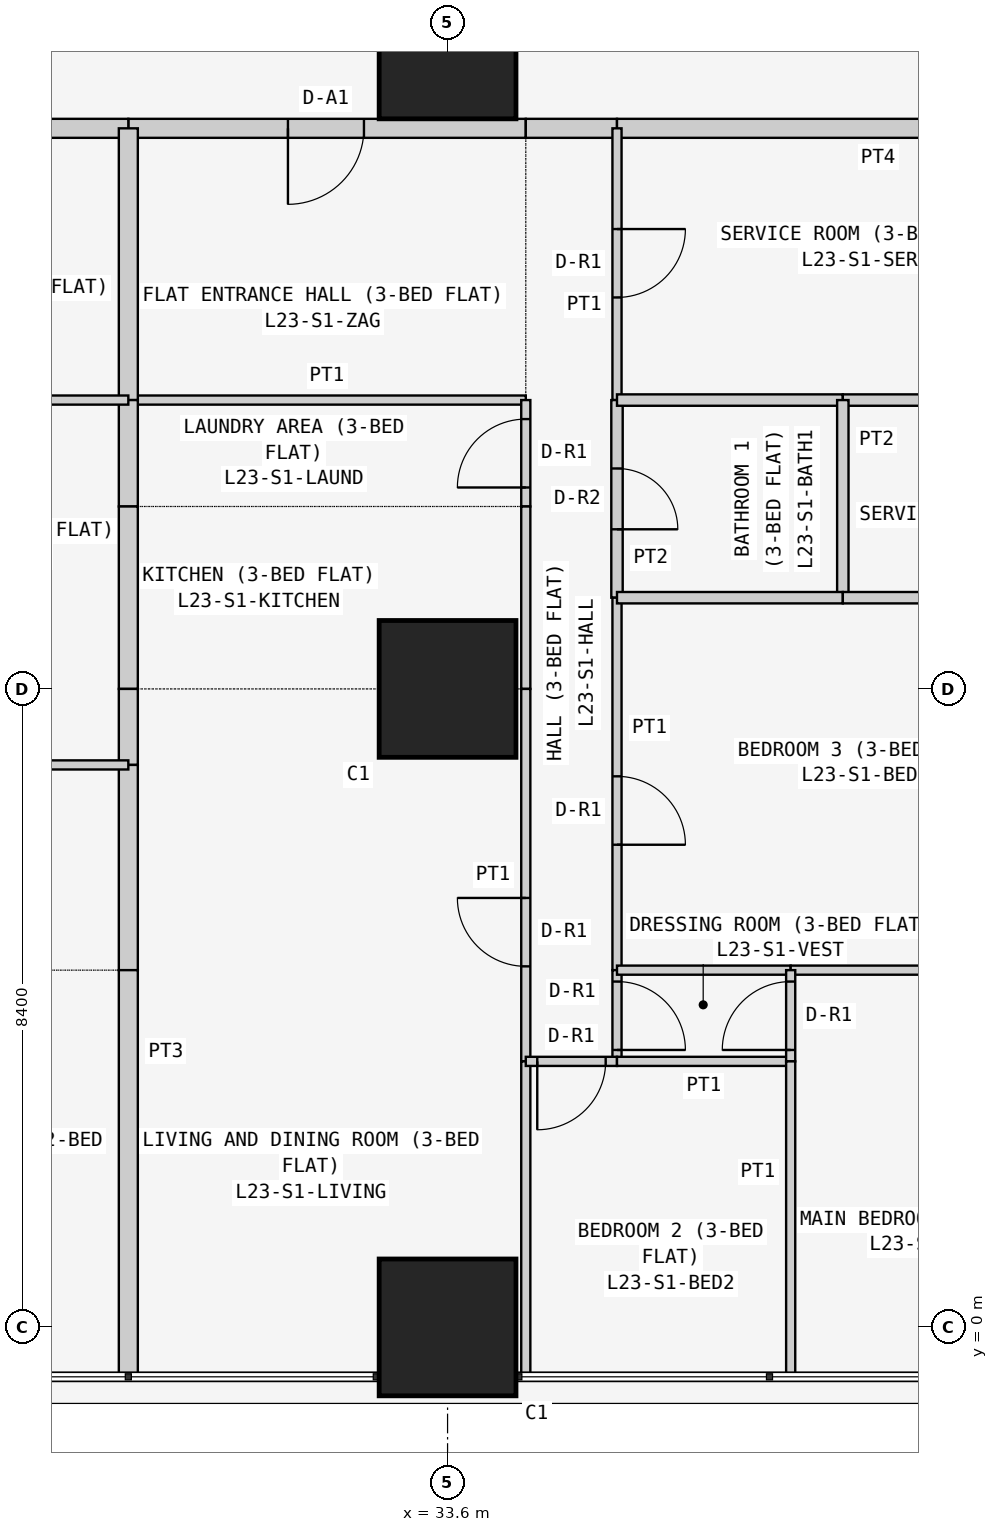
"""IFC4 building model, lengths in metres.
Left out: names, types, materials, properties, quantities, classifications, styles, units other than length and angle.
Written with IfcOpenShell. Run it as: python <this file> out.ifc"""

import sys

from ifc_helpers import new_model, si_unit, direction, frame, frame_2d, origin, origin_2d, place, context, subcontext, project, spatial, rectangle, extrude, element, fill, save


model = new_model("IFC4")
c1 = context("Model", 3, precision=1e-05, world=origin(), true_north=direction((0.0, 1.0)))
c2 = subcontext(c1, "Body", "Model", "MODEL_VIEW")
j1 = project(units=[si_unit("LENGTHUNIT", "METRE"), si_unit("PLANEANGLEUNIT", "RADIAN")], contexts=[c1])
p1 = place(None, origin())
s1 = spatial("IfcSite", under=j1, at=p1, CompositionType="ELEMENT")
p2 = place(p1, origin())
s2 = spatial("IfcBuilding", under=s1, at=p2, CompositionType="ELEMENT")
p3 = place(p2, frame((0.0, 0.0, 92.1)))
s3 = spatial("IfcBuildingStorey", under=s2, at=p3, CompositionType="ELEMENT", Elevation=92.1)
for number, where, z_axis, x_axis in (
    (1, (33.6, 0.0, 0.0), (0.0, 0.0, 1.0), (1.0, 0.0, 0.0)),
    (2, (33.6, 8.4, 0.0), (0.0, 0.0, 1.0), (1.0, 0.0, 0.0)),
    (3, (33.6, 16.8, 0.0), (0.0, 0.0, 1.0), (1.0, 0.0, 0.0)),
):
    element("IfcColumn", number, at=place(p3, frame(where, z_axis=z_axis, x_axis=x_axis)), inside=s3, PredefinedType="COLUMN", context=c2, shape_type="SweptSolid", body=[
        extrude(rectangle(XDim=1.8, YDim=1.8, at=origin_2d()), origin(), (0.0, 0.0, 1.0), 3.6),
    ])
p4 = place(p3, frame((34.629, 15.775, 0.0), z_axis=(0.0, 0.0, 1.0), x_axis=(-1.0, 0.0, 0.0)))
e4 = element("IfcWall", 4, at=p4, inside=s3, PredefinedType="PARTITIONING", context=c2, shape_type="SweptSolid", body=[
    extrude(rectangle(XDim=5.229, YDim=0.25, at=frame_2d((2.615, 0.0))), origin(), (0.0, 0.0, 1.0), 3.45),
])
p5 = place(p4, frame((2.129, 0.0, 0.0)))
e5 = element("IfcOpeningElement", 5, at=p5, cuts=e4, PredefinedType="OPENING", context=c2, shape_type="SweptSolid", body=[
    extrude(rectangle(XDim=1.0, YDim=2.1, at=frame_2d((0.5, 1.05))), frame((0.0, 0.135, 0.0), z_axis=(0.0, -1.0, 0.0), x_axis=(1.0, 0.0, 0.0)), (0.0, 0.0, 1.0), 0.27),
])
p6 = place(p3, frame((35.829, 15.775, 0.0), z_axis=(0.0, 0.0, 1.0), x_axis=(-1.0, 0.0, 0.0)))
e6 = element("IfcWall", 6, at=p6, inside=s3, PredefinedType="PARTITIONING", context=c2, shape_type="SweptSolid", body=[
    extrude(rectangle(XDim=1.2, YDim=0.25, at=frame_2d((0.6, 0.0))), origin(), (0.0, 0.0, 1.0), 3.45),
])
p7 = place(p3, frame((42.7, 15.775, 0.0), z_axis=(0.0, 0.0, 1.0), x_axis=(-1.0, 0.0, 0.0)))
e7 = element("IfcWall", 7, at=p7, inside=s3, PredefinedType="PARTITIONING", context=c2, shape_type="SweptSolid", body=[
    extrude(rectangle(XDim=6.871, YDim=0.25, at=frame_2d((3.436, 0.0))), origin(), (0.0, 0.0, 1.0), 3.45),
])
p8 = place(p3, frame((29.4, 15.775, 0.0), z_axis=(0.0, 0.0, 1.0), x_axis=(-1.0, 0.0, 0.0)))
e8 = element("IfcWall", 8, at=p8, inside=s3, PredefinedType="PARTITIONING", context=c2, shape_type="SweptSolid", body=[
    extrude(rectangle(XDim=5.229, YDim=0.25, at=frame_2d((2.615, 0.0))), origin(), (0.0, 0.0, 1.0), 3.45),
])
p9 = place(p8, frame((2.1, 0.0, 0.0)))
e9 = element("IfcOpeningElement", 9, at=p9, cuts=e8, PredefinedType="OPENING", context=c2, shape_type="SweptSolid", body=[
    extrude(rectangle(XDim=1.0, YDim=2.1, at=frame_2d((0.5, 1.05))), frame((0.0, 0.135, 0.0), z_axis=(0.0, -1.0, 0.0), x_axis=(1.0, 0.0, 0.0)), (0.0, 0.0, 1.0), 0.27),
])
p10 = place(p3, frame((29.4, 12.2, 0.0), z_axis=(0.0, 0.0, 1.0), x_axis=(1.0, 0.0, 0.0)))
e10 = element("IfcWall", 10, at=p10, inside=s3, PredefinedType="PARTITIONING", context=c2, shape_type="SweptSolid", body=[
    extrude(rectangle(XDim=5.229, YDim=0.12, at=frame_2d((2.615, 0.0))), origin(), (0.0, 0.0, 1.0), 3.45),
])
p11 = place(p3, frame((29.4, 15.775, 0.0), z_axis=(0.0, 0.0, 1.0), x_axis=(0.0, -1.0, 0.0)))
e11 = element("IfcWall", 11, at=p11, inside=s3, PredefinedType="PARTITIONING", context=c2, shape_type="SweptSolid", body=[
    extrude(rectangle(XDim=3.575, YDim=0.25, at=frame_2d((1.788, 0.0))), origin(), (0.0, 0.0, 1.0), 2.848),
])
p12 = place(p3, frame((34.629, 10.8, 0.0), z_axis=(0.0, 0.0, 1.0), x_axis=(0.0, 1.0, 0.0)))
e12 = element("IfcWall", 12, at=p12, inside=s3, PredefinedType="PARTITIONING", context=c2, shape_type="SweptSolid", body=[
    extrude(rectangle(XDim=1.4, YDim=0.12, at=frame_2d((0.7, 0.0))), origin(), (0.0, 0.0, 1.0), 3.45),
])
p13 = place(p12, frame((0.25, 0.0, 0.0)))
e13 = element("IfcOpeningElement", 13, at=p13, cuts=e12, PredefinedType="OPENING", context=c2, shape_type="SweptSolid", body=[
    extrude(rectangle(XDim=0.9, YDim=2.1, at=frame_2d((0.45, 1.05))), frame((0.0, 0.07, 0.0), z_axis=(0.0, -1.0, 0.0), x_axis=(1.0, 0.0, 0.0)), (0.0, 0.0, 1.0), 0.14),
])
p14 = place(p3, frame((29.4, 12.2, 0.0), z_axis=(0.0, 0.0, 1.0), x_axis=(0.0, -1.0, 0.0)))
e14 = element("IfcWall", 14, at=p14, inside=s3, PredefinedType="PARTITIONING", context=c2, shape_type="SweptSolid", body=[
    extrude(rectangle(XDim=1.4, YDim=0.25, at=frame_2d((0.7, 0.0))), origin(), (0.0, 0.0, 1.0), 2.848),
])
p15 = place(p3, frame((34.629, 8.4, 0.0), z_axis=(0.0, 0.0, 1.0), x_axis=(0.0, 1.0, 0.0)))
e15 = element("IfcWall", 15, at=p15, inside=s3, PredefinedType="PARTITIONING", context=c2, shape_type="SweptSolid", body=[
    extrude(rectangle(XDim=2.4, YDim=0.12, at=frame_2d((1.2, 0.0))), origin(), (0.0, 0.0, 1.0), 3.45),
])
p16 = place(p3, frame((29.4, 10.8, 0.0), z_axis=(0.0, 0.0, 1.0), x_axis=(0.0, -1.0, 0.0)))
e16 = element("IfcWall", 16, at=p16, inside=s3, PredefinedType="PARTITIONING", context=c2, shape_type="SweptSolid", body=[
    extrude(rectangle(XDim=2.4, YDim=0.25, at=frame_2d((1.2, 0.0))), origin(), (0.0, 0.0, 1.0), 2.848),
])
p17 = place(p3, frame((34.629, 3.5, 0.0), z_axis=(0.0, 0.0, 1.0), x_axis=(0.0, 1.0, 0.0)))
e17 = element("IfcWall", 17, at=p17, inside=s3, PredefinedType="PARTITIONING", context=c2, shape_type="SweptSolid", body=[
    extrude(rectangle(XDim=4.9, YDim=0.12, at=frame_2d((2.45, 0.0))), origin(), (0.0, 0.0, 1.0), 3.45),
])
p18 = place(p17, frame((1.25, 0.0, 0.0)))
e18 = element("IfcOpeningElement", 18, at=p18, cuts=e17, PredefinedType="OPENING", context=c2, shape_type="SweptSolid", body=[
    extrude(rectangle(XDim=0.9, YDim=2.1, at=frame_2d((0.45, 1.05))), frame((0.0, 0.07, 0.0), z_axis=(0.0, -1.0, 0.0), x_axis=(1.0, 0.0, 0.0)), (0.0, 0.0, 1.0), 0.14),
])
p19 = place(p3, frame((34.629, -0.65, 0.0), z_axis=(0.0, 0.0, 1.0), x_axis=(0.0, 1.0, 0.0)))
e19 = element("IfcWall", 19, at=p19, inside=s3, PredefinedType="PARTITIONING", context=c2, shape_type="SweptSolid", body=[
    extrude(rectangle(XDim=4.15, YDim=0.12, at=frame_2d((2.075, 0.0))), origin(), (0.0, 0.0, 1.0), 3.45),
])
p20 = place(p3, frame((29.4, 8.4, 0.0), z_axis=(0.0, 0.0, 1.0), x_axis=(0.0, -1.0, 0.0)))
e20 = element("IfcWall", 20, at=p20, inside=s3, PredefinedType="PARTITIONING", context=c2, shape_type="SweptSolid", body=[
    extrude(rectangle(XDim=1.0, YDim=0.25, at=frame_2d((0.5, 0.0))), origin(), (0.0, 0.0, 1.0), 2.848),
])
p21 = place(p3, frame((29.4, 7.4, 0.0), z_axis=(0.0, 0.0, 1.0), x_axis=(0.0, -1.0, 0.0)))
e21 = element("IfcWall", 21, at=p21, inside=s3, PredefinedType="PARTITIONING", context=c2, shape_type="SweptSolid", body=[
    extrude(rectangle(XDim=2.7, YDim=0.25, at=frame_2d((1.35, 0.0))), origin(), (0.0, 0.0, 1.0), 2.848),
])
p22 = place(p3, frame((29.4, 4.7, 0.0), z_axis=(0.0, 0.0, 1.0), x_axis=(0.0, -1.0, 0.0)))
e22 = element("IfcWall", 22, at=p22, inside=s3, PredefinedType="PARTITIONING", context=c2, shape_type="SweptSolid", body=[
    extrude(rectangle(XDim=5.35, YDim=0.25, at=frame_2d((2.675, 0.0))), origin(), (0.0, 0.0, 1.0), 2.848),
])
p23 = place(p3, frame((35.829, 12.2, 0.0), z_axis=(0.0, 0.0, 1.0), x_axis=(0.0, 1.0, 0.0)))
e23 = element("IfcWall", 23, at=p23, inside=s3, PredefinedType="PARTITIONING", context=c2, shape_type="SweptSolid", body=[
    extrude(rectangle(XDim=3.575, YDim=0.12, at=frame_2d((1.788, 0.0))), origin(), (0.0, 0.0, 1.0), 3.45),
])
p24 = place(p23, frame((1.35, 0.0, 0.0)))
e24 = element("IfcOpeningElement", 24, at=p24, cuts=e23, PredefinedType="OPENING", context=c2, shape_type="SweptSolid", body=[
    extrude(rectangle(XDim=0.9, YDim=2.1, at=frame_2d((0.45, 1.05))), frame((0.0, 0.07, 0.0), z_axis=(0.0, -1.0, 0.0), x_axis=(1.0, 0.0, 0.0)), (0.0, 0.0, 1.0), 0.14),
])
p25 = place(p3, frame((35.829, 9.6, 0.0), z_axis=(0.0, 0.0, 1.0), x_axis=(0.0, 1.0, 0.0)))
e25 = element("IfcWall", 25, at=p25, inside=s3, PredefinedType="PARTITIONING", context=c2, shape_type="SweptSolid", body=[
    extrude(rectangle(XDim=2.6, YDim=0.15, at=frame_2d((1.3, 0.0))), origin(), (0.0, 0.0, 1.0), 3.45),
])
p26 = place(p25, frame((0.9, 0.0, 0.0)))
e26 = element("IfcOpeningElement", 26, at=p26, cuts=e25, PredefinedType="OPENING", context=c2, shape_type="SweptSolid", body=[
    extrude(rectangle(XDim=0.8, YDim=2.1, at=frame_2d((0.4, 1.05))), frame((0.0, 0.085, 0.0), z_axis=(0.0, -1.0, 0.0), x_axis=(1.0, 0.0, 0.0)), (0.0, 0.0, 1.0), 0.17),
])
p27 = place(p3, frame((35.829, 4.7, 0.0), z_axis=(0.0, 0.0, 1.0), x_axis=(0.0, 1.0, 0.0)))
e27 = element("IfcWall", 27, at=p27, inside=s3, PredefinedType="PARTITIONING", context=c2, shape_type="SweptSolid", body=[
    extrude(rectangle(XDim=4.9, YDim=0.12, at=frame_2d((2.45, 0.0))), origin(), (0.0, 0.0, 1.0), 3.45),
])
p28 = place(p27, frame((1.65, 0.0, 0.0)))
e28 = element("IfcOpeningElement", 28, at=p28, cuts=e27, PredefinedType="OPENING", context=c2, shape_type="SweptSolid", body=[
    extrude(rectangle(XDim=0.9, YDim=2.1, at=frame_2d((0.45, 1.05))), frame((0.0, 0.07, 0.0), z_axis=(0.0, -1.0, 0.0), x_axis=(1.0, 0.0, 0.0)), (0.0, 0.0, 1.0), 0.14),
])
p29 = place(p3, frame((35.829, 3.5, 0.0), z_axis=(0.0, 0.0, 1.0), x_axis=(0.0, 1.0, 0.0)))
e29 = element("IfcWall", 29, at=p29, inside=s3, PredefinedType="PARTITIONING", context=c2, shape_type="SweptSolid", body=[
    extrude(rectangle(XDim=1.2, YDim=0.12, at=frame_2d((0.6, 0.0))), origin(), (0.0, 0.0, 1.0), 3.45),
])
p30 = place(p29, frame((0.15, 0.0, 0.0)))
e30 = element("IfcOpeningElement", 30, at=p30, cuts=e29, PredefinedType="OPENING", context=c2, shape_type="SweptSolid", body=[
    extrude(rectangle(XDim=0.9, YDim=2.1, at=frame_2d((0.45, 1.05))), frame((0.0, 0.07, 0.0), z_axis=(0.0, -1.0, 0.0), x_axis=(1.0, 0.0, 0.0)), (0.0, 0.0, 1.0), 0.14),
])
p31 = place(p3, frame((34.629, 3.5, 0.0), z_axis=(0.0, 0.0, 1.0), x_axis=(1.0, 0.0, 0.0)))
e31 = element("IfcWall", 31, at=p31, inside=s3, PredefinedType="PARTITIONING", context=c2, shape_type="SweptSolid", body=[
    extrude(rectangle(XDim=1.2, YDim=0.12, at=frame_2d((0.6, 0.0))), origin(), (0.0, 0.0, 1.0), 3.45),
])
p32 = place(p31, frame((0.151, 0.0, 0.0)))
e32 = element("IfcOpeningElement", 32, at=p32, cuts=e31, PredefinedType="OPENING", context=c2, shape_type="SweptSolid", body=[
    extrude(rectangle(XDim=0.9, YDim=2.1, at=frame_2d((0.45, 1.05))), frame((0.0, 0.07, 0.0), z_axis=(0.0, -1.0, 0.0), x_axis=(1.0, 0.0, 0.0)), (0.0, 0.0, 1.0), 0.14),
])
p33 = place(p3, frame((35.829, 12.2, 0.0), z_axis=(0.0, 0.0, 1.0), x_axis=(1.0, 0.0, 0.0)))
e33 = element("IfcWall", 33, at=p33, inside=s3, PredefinedType="PARTITIONING", context=c2, shape_type="SweptSolid", body=[
    extrude(rectangle(XDim=2.971, YDim=0.15, at=frame_2d((1.485, 0.0))), origin(), (0.0, 0.0, 1.0), 3.45),
])
p34 = place(p3, frame((38.8, 12.2, 0.0), z_axis=(0.0, 0.0, 1.0), x_axis=(1.0, 0.0, 0.0)))
e34 = element("IfcWall", 34, at=p34, inside=s3, PredefinedType="PARTITIONING", context=c2, shape_type="SweptSolid", body=[
    extrude(rectangle(XDim=3.9, YDim=0.15, at=frame_2d((1.95, 0.0))), origin(), (0.0, 0.0, 1.0), 3.45),
])
p35 = place(p34, frame((1.25, 0.0, 0.0)))
e35 = element("IfcOpeningElement", 35, at=p35, cuts=e34, PredefinedType="OPENING", context=c2, shape_type="SweptSolid", body=[
    extrude(rectangle(XDim=0.8, YDim=2.1, at=frame_2d((0.4, 1.05))), frame((0.0, 0.085, 0.0), z_axis=(0.0, -1.0, 0.0), x_axis=(1.0, 0.0, 0.0)), (0.0, 0.0, 1.0), 0.17),
])
p36 = place(p3, frame((38.8, 9.6, 0.0), z_axis=(0.0, 0.0, 1.0), x_axis=(0.0, 1.0, 0.0)))
e36 = element("IfcWall", 36, at=p36, inside=s3, PredefinedType="PARTITIONING", context=c2, shape_type="SweptSolid", body=[
    extrude(rectangle(XDim=2.6, YDim=0.15, at=frame_2d((1.3, 0.0))), origin(), (0.0, 0.0, 1.0), 3.45),
])
p37 = place(p3, frame((35.829, 9.6, 0.0), z_axis=(0.0, 0.0, 1.0), x_axis=(1.0, 0.0, 0.0)))
e37 = element("IfcWall", 37, at=p37, inside=s3, PredefinedType="PARTITIONING", context=c2, shape_type="SweptSolid", body=[
    extrude(rectangle(XDim=2.971, YDim=0.15, at=frame_2d((1.485, 0.0))), origin(), (0.0, 0.0, 1.0), 3.45),
])
p38 = place(p3, frame((38.8, 9.6, 0.0), z_axis=(0.0, 0.0, 1.0), x_axis=(1.0, 0.0, 0.0)))
e38 = element("IfcWall", 38, at=p38, inside=s3, PredefinedType="PARTITIONING", context=c2, shape_type="SweptSolid", body=[
    extrude(rectangle(XDim=3.9, YDim=0.15, at=frame_2d((1.95, 0.0))), origin(), (0.0, 0.0, 1.0), 3.45),
])
p39 = place(p3, frame((35.829, 4.7, 0.0), z_axis=(0.0, 0.0, 1.0), x_axis=(1.0, 0.0, 0.0)))
e39 = element("IfcWall", 39, at=p39, inside=s3, PredefinedType="PARTITIONING", context=c2, shape_type="SweptSolid", body=[
    extrude(rectangle(XDim=2.285, YDim=0.12, at=frame_2d((1.143, 0.0))), origin(), (0.0, 0.0, 1.0), 3.45),
])
p40 = place(p3, frame((38.114, 4.7, 0.0), z_axis=(0.0, 0.0, 1.0), x_axis=(1.0, 0.0, 0.0)))
e40 = element("IfcWall", 40, at=p40, inside=s3, PredefinedType="PARTITIONING", context=c2, shape_type="SweptSolid", body=[
    extrude(rectangle(XDim=4.586, YDim=0.12, at=frame_2d((2.293, 0.0))), origin(), (0.0, 0.0, 1.0), 3.45),
])
p41 = place(p3, frame((35.829, 3.5, 0.0), z_axis=(0.0, 0.0, 1.0), x_axis=(1.0, 0.0, 0.0)))
e41 = element("IfcWall", 41, at=p41, inside=s3, PredefinedType="PARTITIONING", context=c2, shape_type="SweptSolid", body=[
    extrude(rectangle(XDim=2.285, YDim=0.12, at=frame_2d((1.143, 0.0))), origin(), (0.0, 0.0, 1.0), 3.45),
])
p42 = place(p3, frame((38.114, 3.5, 0.0), z_axis=(0.0, 0.0, 1.0), x_axis=(0.0, 1.0, 0.0)))
e42 = element("IfcWall", 42, at=p42, inside=s3, PredefinedType="PARTITIONING", context=c2, shape_type="SweptSolid", body=[
    extrude(rectangle(XDim=1.2, YDim=0.12, at=frame_2d((0.6, 0.0))), origin(), (0.0, 0.0, 1.0), 3.45),
])
p43 = place(p42, frame((0.15, 0.0, 0.0)))
e43 = element("IfcOpeningElement", 43, at=p43, cuts=e42, PredefinedType="OPENING", context=c2, shape_type="SweptSolid", body=[
    extrude(rectangle(XDim=0.9, YDim=2.1, at=frame_2d((0.45, 1.05))), frame((0.0, 0.07, 0.0), z_axis=(0.0, -1.0, 0.0), x_axis=(1.0, 0.0, 0.0)), (0.0, 0.0, 1.0), 0.14),
])
p44 = place(p3, frame((38.114, -0.65, 0.0), z_axis=(0.0, 0.0, 1.0), x_axis=(0.0, 1.0, 0.0)))
e44 = element("IfcWall", 44, at=p44, inside=s3, PredefinedType="PARTITIONING", context=c2, shape_type="SweptSolid", body=[
    extrude(rectangle(XDim=4.15, YDim=0.12, at=frame_2d((2.075, 0.0))), origin(), (0.0, 0.0, 1.0), 3.45),
])
for number, where, z_axis, x_axis in (
    (45, (29.4, 12.2, 0.0), (0.0, 0.0, 1.0), (-1.0, 0.0, 0.0)),
    (46, (29.4, 7.4, 0.0), (0.0, 0.0, 1.0), (-1.0, 0.0, 0.0)),
):
    element("IfcWall", number, at=place(p3, frame(where, z_axis=z_axis, x_axis=x_axis)), inside=s3, PredefinedType="PARTITIONING", context=c2, shape_type="SweptSolid", body=[
        extrude(rectangle(XDim=5.229, YDim=0.12, at=frame_2d((2.615, 0.0))), origin(), (0.0, 0.0, 1.0), 3.45),
    ])
p45 = place(p5, origin())
e47 = element("IfcDoor", 47, at=p45, inside=s3, OperationType="SINGLE_SWING_RIGHT", PredefinedType="DOOR", context=c2, shape_type="SweptSolid", body=[
    extrude(rectangle(XDim=1.0, YDim=2.1, at=frame_2d((0.5, 1.05))), frame((0.0, 0.025, 0.0), z_axis=(0.0, -1.0, 0.0), x_axis=(1.0, 0.0, 0.0)), (0.0, 0.0, 1.0), 0.05),
])
fill(e5, e47)
p46 = place(p13, origin())
e48 = element("IfcDoor", 48, at=p46, inside=s3, OperationType="SINGLE_SWING_LEFT", PredefinedType="DOOR", context=c2, shape_type="SweptSolid", body=[
    extrude(rectangle(XDim=0.9, YDim=2.1, at=frame_2d((0.45, 1.05))), frame((0.0, 0.025, 0.0), z_axis=(0.0, -1.0, 0.0), x_axis=(1.0, 0.0, 0.0)), (0.0, 0.0, 1.0), 0.05),
])
fill(e13, e48)
p47 = place(p18, origin())
e49 = element("IfcDoor", 49, at=p47, inside=s3, OperationType="SINGLE_SWING_RIGHT", PredefinedType="DOOR", context=c2, shape_type="SweptSolid", body=[
    extrude(rectangle(XDim=0.9, YDim=2.1, at=frame_2d((0.45, 1.05))), frame((0.0, 0.025, 0.0), z_axis=(0.0, -1.0, 0.0), x_axis=(1.0, 0.0, 0.0)), (0.0, 0.0, 1.0), 0.05),
])
fill(e18, e49)
p48 = place(p24, frame((0.9, 0.0, 0.0), z_axis=(0.0, 0.0, 1.0), x_axis=(-1.0, 0.0, 0.0)))
e50 = element("IfcDoor", 50, at=p48, inside=s3, OperationType="SINGLE_SWING_LEFT", PredefinedType="DOOR", context=c2, shape_type="SweptSolid", body=[
    extrude(rectangle(XDim=0.9, YDim=2.1, at=frame_2d((0.45, 1.05))), frame((0.0, 0.025, 0.0), z_axis=(0.0, -1.0, 0.0), x_axis=(1.0, 0.0, 0.0)), (0.0, 0.0, 1.0), 0.05),
])
fill(e24, e50)
p49 = place(p26, frame((0.8, 0.0, 0.0), z_axis=(0.0, 0.0, 1.0), x_axis=(-1.0, 0.0, 0.0)))
e51 = element("IfcDoor", 51, at=p49, inside=s3, OperationType="SINGLE_SWING_RIGHT", PredefinedType="DOOR", context=c2, shape_type="SweptSolid", body=[
    extrude(rectangle(XDim=0.8, YDim=2.1, at=frame_2d((0.4, 1.05))), frame((0.0, 0.025, 0.0), z_axis=(0.0, -1.0, 0.0), x_axis=(1.0, 0.0, 0.0)), (0.0, 0.0, 1.0), 0.05),
])
fill(e26, e51)
p50 = place(p28, frame((0.9, 0.0, 0.0), z_axis=(0.0, 0.0, 1.0), x_axis=(-1.0, 0.0, 0.0)))
e52 = element("IfcDoor", 52, at=p50, inside=s3, OperationType="SINGLE_SWING_RIGHT", PredefinedType="DOOR", context=c2, shape_type="SweptSolid", body=[
    extrude(rectangle(XDim=0.9, YDim=2.1, at=frame_2d((0.45, 1.05))), frame((0.0, 0.025, 0.0), z_axis=(0.0, -1.0, 0.0), x_axis=(1.0, 0.0, 0.0)), (0.0, 0.0, 1.0), 0.05),
])
fill(e28, e52)
p51 = place(p30, frame((0.9, 0.0, 0.0), z_axis=(0.0, 0.0, 1.0), x_axis=(-1.0, 0.0, 0.0)))
e53 = element("IfcDoor", 53, at=p51, inside=s3, OperationType="SINGLE_SWING_RIGHT", PredefinedType="DOOR", context=c2, shape_type="SweptSolid", body=[
    extrude(rectangle(XDim=0.9, YDim=2.1, at=frame_2d((0.45, 1.05))), frame((0.0, 0.025, 0.0), z_axis=(0.0, -1.0, 0.0), x_axis=(1.0, 0.0, 0.0)), (0.0, 0.0, 1.0), 0.05),
])
fill(e30, e53)
p52 = place(p43, origin())
e54 = element("IfcDoor", 54, at=p52, inside=s3, OperationType="SINGLE_SWING_LEFT", PredefinedType="DOOR", context=c2, shape_type="SweptSolid", body=[
    extrude(rectangle(XDim=0.9, YDim=2.1, at=frame_2d((0.45, 1.05))), frame((0.0, 0.025, 0.0), z_axis=(0.0, -1.0, 0.0), x_axis=(1.0, 0.0, 0.0)), (0.0, 0.0, 1.0), 0.05),
])
fill(e43, e54)
p53 = place(p32, frame((0.9, 0.0, 0.0), z_axis=(0.0, 0.0, 1.0), x_axis=(-1.0, 0.0, 0.0)))
e55 = element("IfcDoor", 55, at=p53, inside=s3, OperationType="SINGLE_SWING_RIGHT", PredefinedType="DOOR", context=c2, shape_type="SweptSolid", body=[
    extrude(rectangle(XDim=0.9, YDim=2.1, at=frame_2d((0.45, 1.05))), frame((0.0, 0.025, 0.0), z_axis=(0.0, -1.0, 0.0), x_axis=(1.0, 0.0, 0.0)), (0.0, 0.0, 1.0), 0.05),
])
fill(e32, e55)
save(model, sys.argv[1])
